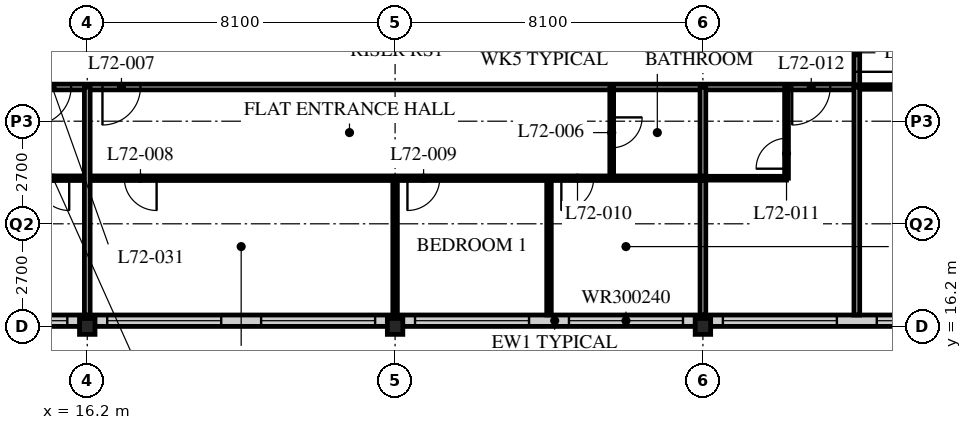
"""IFC4 building model, lengths in metres.
Left out: names, types, materials, properties, quantities, classifications, styles, units other than length and angle.
Written with IfcOpenShell. Run it as: python <this file> out.ifc"""

import sys

from ifc_helpers import new_model, si_unit, direction, frame, frame_2d, origin, origin_2d, place, context, subcontext, project, spatial, rectangle, i_section, extrude, element, fill, save


model = new_model("IFC4")
c1 = context("Model", 3, precision=1e-05, world=origin(), true_north=direction((0.0, 1.0)))
c2 = subcontext(c1, "Body", "Model", "MODEL_VIEW")
j1 = project(units=[si_unit("LENGTHUNIT", "METRE"), si_unit("PLANEANGLEUNIT", "RADIAN")], contexts=[c1])
p1 = place(None, origin())
s1 = spatial("IfcSite", under=j1, at=p1, CompositionType="ELEMENT")
p2 = place(p1, origin())
s2 = spatial("IfcBuilding", under=s1, at=p2, CompositionType="ELEMENT")
p3 = place(p2, frame((0.0, 0.0, 281.4)))
s3 = spatial("IfcBuildingStorey", under=s2, at=p3, CompositionType="ELEMENT", Elevation=281.4)
for number, where, z_axis, x_axis in (
    (1, (16.2, 16.2, 0.0), (0.0, 0.0, 1.0), (1.0, 0.0, 0.0)),
    (2, (24.3, 16.2, 0.0), (0.0, 0.0, 1.0), (1.0, 0.0, 0.0)),
    (3, (32.4, 16.2, 0.0), (0.0, 0.0, 1.0), (1.0, 0.0, 0.0)),
):
    element("IfcColumn", number, at=place(p3, frame(where, z_axis=z_axis, x_axis=x_axis)), inside=s3, PredefinedType="COLUMN", context=c2, shape_type="SweptSolid", body=[
        extrude(i_section(OverallWidth=0.407, OverallDepth=0.419, WebThickness=0.031, FlangeThickness=0.049, FilletRadius=0.015, at=origin_2d()), origin(), (0.0, 0.0, 1.0), 3.9),
    ])
p4 = place(p3, frame((8.4, 16.35, 0.0), z_axis=(0.0, 0.0, 1.0), x_axis=(1.0, 0.0, 0.0)))
e4 = element("IfcWall", 4, at=p4, inside=s3, PredefinedType="SOLIDWALL", context=c2, shape_type="SweptSolid", body=[
    extrude(rectangle(XDim=40.2, YDim=0.3, at=frame_2d((20.1, 0.0))), origin(), (0.0, 0.0, 1.0), 3.69),
])
p5 = place(p4, frame((0.225, 0.0, 0.6)))
e5 = element("IfcOpeningElement", 5, at=p5, cuts=e4, PredefinedType="OPENING", context=c2, shape_type="SweptSolid", body=[
    extrude(rectangle(XDim=3.0, YDim=2.4, at=frame_2d((1.5, 1.2))), frame((0.0, 0.16, 0.0), z_axis=(0.0, -1.0, 0.0), x_axis=(1.0, 0.0, 0.0)), (0.0, 0.0, 1.0), 0.32),
])
p6 = place(p4, frame((4.275, 0.0, 0.6)))
e6 = element("IfcOpeningElement", 6, at=p6, cuts=e4, PredefinedType="OPENING", context=c2, shape_type="SweptSolid", body=[
    extrude(rectangle(XDim=3.0, YDim=2.4, at=frame_2d((1.5, 1.2))), frame((0.0, 0.16, 0.0), z_axis=(0.0, -1.0, 0.0), x_axis=(1.0, 0.0, 0.0)), (0.0, 0.0, 1.0), 0.32),
])
p7 = place(p4, frame((8.325, 0.0, 0.6)))
e7 = element("IfcOpeningElement", 7, at=p7, cuts=e4, PredefinedType="OPENING", context=c2, shape_type="SweptSolid", body=[
    extrude(rectangle(XDim=3.0, YDim=2.4, at=frame_2d((1.5, 1.2))), frame((0.0, 0.16, 0.0), z_axis=(0.0, -1.0, 0.0), x_axis=(1.0, 0.0, 0.0)), (0.0, 0.0, 1.0), 0.32),
])
p8 = place(p4, frame((12.375, 0.0, 0.6)))
e8 = element("IfcOpeningElement", 8, at=p8, cuts=e4, PredefinedType="OPENING", context=c2, shape_type="SweptSolid", body=[
    extrude(rectangle(XDim=3.0, YDim=2.4, at=frame_2d((1.5, 1.2))), frame((0.0, 0.16, 0.0), z_axis=(0.0, -1.0, 0.0), x_axis=(1.0, 0.0, 0.0)), (0.0, 0.0, 1.0), 0.32),
])
p9 = place(p4, frame((16.425, 0.0, 0.6)))
e9 = element("IfcOpeningElement", 9, at=p9, cuts=e4, PredefinedType="OPENING", context=c2, shape_type="SweptSolid", body=[
    extrude(rectangle(XDim=3.0, YDim=2.4, at=frame_2d((1.5, 1.2))), frame((0.0, 0.16, 0.0), z_axis=(0.0, -1.0, 0.0), x_axis=(1.0, 0.0, 0.0)), (0.0, 0.0, 1.0), 0.32),
])
p10 = place(p4, frame((20.475, 0.0, 0.6)))
e10 = element("IfcOpeningElement", 10, at=p10, cuts=e4, PredefinedType="OPENING", context=c2, shape_type="SweptSolid", body=[
    extrude(rectangle(XDim=3.0, YDim=2.4, at=frame_2d((1.5, 1.2))), frame((0.0, 0.16, 0.0), z_axis=(0.0, -1.0, 0.0), x_axis=(1.0, 0.0, 0.0)), (0.0, 0.0, 1.0), 0.32),
])
p11 = place(p4, frame((24.525, 0.0, 0.6)))
e11 = element("IfcOpeningElement", 11, at=p11, cuts=e4, PredefinedType="OPENING", context=c2, shape_type="SweptSolid", body=[
    extrude(rectangle(XDim=3.0, YDim=2.4, at=frame_2d((1.5, 1.2))), frame((0.0, 0.16, 0.0), z_axis=(0.0, -1.0, 0.0), x_axis=(1.0, 0.0, 0.0)), (0.0, 0.0, 1.0), 0.32),
])
p12 = place(p4, frame((28.575, 0.0, 0.6)))
e12 = element("IfcOpeningElement", 12, at=p12, cuts=e4, PredefinedType="OPENING", context=c2, shape_type="SweptSolid", body=[
    extrude(rectangle(XDim=3.0, YDim=2.4, at=frame_2d((1.5, 1.2))), frame((0.0, 0.16, 0.0), z_axis=(0.0, -1.0, 0.0), x_axis=(1.0, 0.0, 0.0)), (0.0, 0.0, 1.0), 0.32),
])
p13 = place(p4, frame((32.625, 0.0, 0.6)))
e13 = element("IfcOpeningElement", 13, at=p13, cuts=e4, PredefinedType="OPENING", context=c2, shape_type="SweptSolid", body=[
    extrude(rectangle(XDim=3.0, YDim=2.4, at=frame_2d((1.5, 1.2))), frame((0.0, 0.16, 0.0), z_axis=(0.0, -1.0, 0.0), x_axis=(1.0, 0.0, 0.0)), (0.0, 0.0, 1.0), 0.32),
])
p14 = place(p4, frame((36.675, 0.0, 0.6)))
e14 = element("IfcOpeningElement", 14, at=p14, cuts=e4, PredefinedType="OPENING", context=c2, shape_type="SweptSolid", body=[
    extrude(rectangle(XDim=3.0, YDim=2.4, at=frame_2d((1.5, 1.2))), frame((0.0, 0.16, 0.0), z_axis=(0.0, -1.0, 0.0), x_axis=(1.0, 0.0, 0.0)), (0.0, 0.0, 1.0), 0.32),
])
p15 = place(p3, frame((12.15, 22.5, 0.0), z_axis=(0.0, 0.0, 1.0), x_axis=(1.0, 0.0, 0.0)))
e15 = element("IfcWall", 15, at=p15, inside=s3, PredefinedType="PARTITIONING", context=c2, shape_type="SweptSolid", body=[
    extrude(rectangle(XDim=24.3, YDim=0.15, at=frame_2d((12.15, 0.0))), origin(), (0.0, 0.0, 1.0), 3.69),
])
p16 = place(p15, frame((4.45, 0.0, 0.0)))
e16 = element("IfcOpeningElement", 16, at=p16, cuts=e15, PredefinedType="OPENING", context=c2, shape_type="SweptSolid", body=[
    extrude(rectangle(XDim=1.0, YDim=2.1, at=frame_2d((0.5, 1.05))), frame((0.0, 0.085, 0.0), z_axis=(0.0, -1.0, 0.0), x_axis=(1.0, 0.0, 0.0)), (0.0, 0.0, 1.0), 0.17),
])
p17 = place(p15, frame((22.6, 0.0, 0.0)))
e17 = element("IfcOpeningElement", 17, at=p17, cuts=e15, PredefinedType="OPENING", context=c2, shape_type="SweptSolid", body=[
    extrude(rectangle(XDim=1.0, YDim=2.1, at=frame_2d((0.5, 1.05))), frame((0.0, 0.085, 0.0), z_axis=(0.0, -1.0, 0.0), x_axis=(1.0, 0.0, 0.0)), (0.0, 0.0, 1.0), 0.17),
])
p18 = place(p15, frame((2.625, 0.0, 0.0)))
e18 = element("IfcOpeningElement", 18, at=p18, cuts=e15, PredefinedType="OPENING", context=c2, shape_type="SweptSolid", body=[
    extrude(rectangle(XDim=1.0, YDim=2.1, at=frame_2d((0.5, 1.05))), frame((0.0, 0.085, 0.0), z_axis=(0.0, -1.0, 0.0), x_axis=(1.0, 0.0, 0.0)), (0.0, 0.0, 1.0), 0.17),
])
p19 = place(p3, frame((36.45, 22.5, 0.0), z_axis=(0.0, 0.0, 1.0), x_axis=(0.0, 1.0, 0.0)))
e19 = element("IfcWall", 19, at=p19, inside=s3, PredefinedType="PARTITIONING", context=c2, shape_type="SweptSolid", body=[
    extrude(rectangle(XDim=1.8, YDim=0.15, at=frame_2d((0.9, 0.0))), origin(), (0.0, 0.0, 1.0), 3.69),
])
p20 = place(p19, frame((0.4, 0.0, 0.0)))
e20 = element("IfcOpeningElement", 20, at=p20, cuts=e19, PredefinedType="OPENING", context=c2, shape_type="SweptSolid", body=[
    extrude(rectangle(XDim=1.0, YDim=2.1, at=frame_2d((0.5, 1.05))), frame((0.0, 0.085, 0.0), z_axis=(0.0, -1.0, 0.0), x_axis=(1.0, 0.0, 0.0)), (0.0, 0.0, 1.0), 0.17),
])
p21 = place(p3, frame((30.0, 22.5, 0.0), z_axis=(0.0, 0.0, 1.0), x_axis=(0.0, -1.0, 0.0)))
e21 = element("IfcWall", 21, at=p21, inside=s3, PredefinedType="PARTITIONING", context=c2, shape_type="SweptSolid", body=[
    extrude(rectangle(XDim=2.4, YDim=0.1, at=frame_2d((1.2, 0.0))), origin(), (0.0, 0.0, 1.0), 3.69),
])
p22 = place(p21, frame((0.8, 0.0, 0.0)))
e22 = element("IfcOpeningElement", 22, at=p22, cuts=e21, PredefinedType="OPENING", context=c2, shape_type="SweptSolid", body=[
    extrude(rectangle(XDim=0.8, YDim=2.1, at=frame_2d((0.4, 1.05))), frame((0.0, 0.06, 0.0), z_axis=(0.0, -1.0, 0.0), x_axis=(1.0, 0.0, 0.0)), (0.0, 0.0, 1.0), 0.12),
])
p23 = place(p3, frame((24.3, 20.1, 0.0), z_axis=(0.0, 0.0, 1.0), x_axis=(0.0, -1.0, 0.0)))
e23 = element("IfcWall", 23, at=p23, inside=s3, PredefinedType="PARTITIONING", context=c2, shape_type="SweptSolid", body=[
    extrude(rectangle(XDim=3.6, YDim=0.12, at=frame_2d((1.8, 0.0))), origin(), (0.0, 0.0, 1.0), 3.078),
])
p24 = place(p3, frame((28.35, 20.1, 0.0), z_axis=(0.0, 0.0, 1.0), x_axis=(0.0, -1.0, 0.0)))
e24 = element("IfcWall", 24, at=p24, inside=s3, PredefinedType="PARTITIONING", context=c2, shape_type="SweptSolid", body=[
    extrude(rectangle(XDim=3.6, YDim=0.12, at=frame_2d((1.8, 0.0))), origin(), (0.0, 0.0, 1.0), 3.69),
])
p25 = place(p3, frame((32.4, 22.5, 0.0), z_axis=(0.0, 0.0, 1.0), x_axis=(0.0, -1.0, 0.0)))
e25 = element("IfcWall", 25, at=p25, inside=s3, PredefinedType="PARTITIONING", context=c2, shape_type="SweptSolid", body=[
    extrude(rectangle(XDim=6.0, YDim=0.15, at=frame_2d((3.0, 0.0))), origin(), (0.0, 0.0, 1.0), 3.078),
])
p26 = place(p3, frame((32.4, 20.1, 0.0), z_axis=(0.0, 0.0, 1.0), x_axis=(1.0, 0.0, 0.0)))
e26 = element("IfcWall", 26, at=p26, inside=s3, PredefinedType="PARTITIONING", context=c2, shape_type="SweptSolid", body=[
    extrude(rectangle(XDim=2.2, YDim=0.1, at=frame_2d((1.1, 0.0))), origin(), (0.0, 0.0, 1.0), 3.69),
])
p27 = place(p3, frame((34.6, 22.5, 0.0), z_axis=(0.0, 0.0, 1.0), x_axis=(0.0, -1.0, 0.0)))
e27 = element("IfcWall", 27, at=p27, inside=s3, PredefinedType="PARTITIONING", context=c2, shape_type="SweptSolid", body=[
    extrude(rectangle(XDim=2.4, YDim=0.1, at=frame_2d((1.2, 0.0))), origin(), (0.0, 0.0, 1.0), 3.69),
])
p28 = place(p27, frame((1.35, 0.0, 0.0)))
e28 = element("IfcOpeningElement", 28, at=p28, cuts=e27, PredefinedType="OPENING", context=c2, shape_type="SweptSolid", body=[
    extrude(rectangle(XDim=0.8, YDim=2.1, at=frame_2d((0.4, 1.05))), frame((0.0, 0.06, 0.0), z_axis=(0.0, -1.0, 0.0), x_axis=(1.0, 0.0, 0.0)), (0.0, 0.0, 1.0), 0.12),
])
p29 = place(p3, frame((12.15, 20.1, 0.0), z_axis=(0.0, 0.0, 1.0), x_axis=(1.0, 0.0, 0.0)))
e29 = element("IfcWall", 29, at=p29, inside=s3, PredefinedType="PARTITIONING", context=c2, shape_type="SweptSolid", body=[
    extrude(rectangle(XDim=20.25, YDim=0.12, at=frame_2d((10.125, 0.0))), origin(), (0.0, 0.0, 1.0), 3.69),
])
p30 = place(p29, frame((5.025, 0.0, 0.0)))
e30 = element("IfcOpeningElement", 30, at=p30, cuts=e29, PredefinedType="OPENING", context=c2, shape_type="SweptSolid", body=[
    extrude(rectangle(XDim=0.85, YDim=2.1, at=frame_2d((0.425, 1.05))), frame((0.0, 0.07, 0.0), z_axis=(0.0, -1.0, 0.0), x_axis=(1.0, 0.0, 0.0)), (0.0, 0.0, 1.0), 0.14),
])
p31 = place(p29, frame((12.475, 0.0, 0.0)))
e31 = element("IfcOpeningElement", 31, at=p31, cuts=e29, PredefinedType="OPENING", context=c2, shape_type="SweptSolid", body=[
    extrude(rectangle(XDim=0.85, YDim=2.1, at=frame_2d((0.425, 1.05))), frame((0.0, 0.07, 0.0), z_axis=(0.0, -1.0, 0.0), x_axis=(1.0, 0.0, 0.0)), (0.0, 0.0, 1.0), 0.14),
])
p32 = place(p29, frame((16.525, 0.0, 0.0)))
e32 = element("IfcOpeningElement", 32, at=p32, cuts=e29, PredefinedType="OPENING", context=c2, shape_type="SweptSolid", body=[
    extrude(rectangle(XDim=0.85, YDim=2.1, at=frame_2d((0.425, 1.05))), frame((0.0, 0.07, 0.0), z_axis=(0.0, -1.0, 0.0), x_axis=(1.0, 0.0, 0.0)), (0.0, 0.0, 1.0), 0.14),
])
p33 = place(p29, frame((2.725, 0.0, 0.0)))
e33 = element("IfcOpeningElement", 33, at=p33, cuts=e29, PredefinedType="OPENING", context=c2, shape_type="SweptSolid", body=[
    extrude(rectangle(XDim=0.85, YDim=2.1, at=frame_2d((0.425, 1.05))), frame((0.0, 0.07, 0.0), z_axis=(0.0, -1.0, 0.0), x_axis=(1.0, 0.0, 0.0)), (0.0, 0.0, 1.0), 0.14),
])
p34 = place(p3, frame((16.2, 22.5, 0.0), z_axis=(0.0, 0.0, 1.0), x_axis=(0.0, -1.0, 0.0)))
e34 = element("IfcWall", 34, at=p34, inside=s3, PredefinedType="PARTITIONING", context=c2, shape_type="SweptSolid", body=[
    extrude(rectangle(XDim=6.0, YDim=0.15, at=frame_2d((3.0, 0.0))), origin(), (0.0, 0.0, 1.0), 3.078),
])
p35 = place(p3, frame((36.45, 22.5, 0.0), z_axis=(0.0, 0.0, 1.0), x_axis=(1.0, 0.0, 0.0)))
e35 = element("IfcWall", 35, at=p35, inside=s3, PredefinedType="PARTITIONING", context=c2, shape_type="SweptSolid", body=[
    extrude(rectangle(XDim=6.45, YDim=0.12, at=frame_2d((3.225, 0.0))), origin(), (0.0, 0.0, 1.0), 3.69),
])
p36 = place(p35, frame((2.8, 0.0, 0.0)))
e36 = element("IfcOpeningElement", 36, at=p36, cuts=e35, PredefinedType="OPENING", context=c2, shape_type="SweptSolid", body=[
    extrude(rectangle(XDim=0.85, YDim=2.1, at=frame_2d((0.425, 1.05))), frame((0.0, 0.07, 0.0), z_axis=(0.0, -1.0, 0.0), x_axis=(1.0, 0.0, 0.0)), (0.0, 0.0, 1.0), 0.14),
])
p37 = place(p3, frame((36.45, 16.5, 0.0), z_axis=(0.0, 0.0, 1.0), x_axis=(0.0, 1.0, 0.0)))
e37 = element("IfcWall", 37, at=p37, inside=s3, PredefinedType="PARTITIONING", context=c2, shape_type="SweptSolid", body=[
    extrude(rectangle(XDim=6.0, YDim=0.15, at=frame_2d((3.0, 0.0))), origin(), (0.0, 0.0, 1.0), 3.69),
])
p38 = place(p6, origin())
e38 = element("IfcWindow", 38, at=p38, inside=s3, PartitioningType="SINGLE_PANEL", PredefinedType="WINDOW", context=c2, shape_type="SweptSolid", body=[
    extrude(rectangle(XDim=3.0, YDim=2.4, at=frame_2d((1.5, 1.2))), frame((0.0, 0.03, 0.0), z_axis=(0.0, -1.0, 0.0), x_axis=(1.0, 0.0, 0.0)), (0.0, 0.0, 1.0), 0.06),
])
fill(e6, e38)
p39 = place(p7, origin())
e39 = element("IfcWindow", 39, at=p39, inside=s3, PartitioningType="SINGLE_PANEL", PredefinedType="WINDOW", context=c2, shape_type="SweptSolid", body=[
    extrude(rectangle(XDim=3.0, YDim=2.4, at=frame_2d((1.5, 1.2))), frame((0.0, 0.03, 0.0), z_axis=(0.0, -1.0, 0.0), x_axis=(1.0, 0.0, 0.0)), (0.0, 0.0, 1.0), 0.06),
])
fill(e7, e39)
p40 = place(p8, origin())
e40 = element("IfcWindow", 40, at=p40, inside=s3, PartitioningType="SINGLE_PANEL", PredefinedType="WINDOW", context=c2, shape_type="SweptSolid", body=[
    extrude(rectangle(XDim=3.0, YDim=2.4, at=frame_2d((1.5, 1.2))), frame((0.0, 0.03, 0.0), z_axis=(0.0, -1.0, 0.0), x_axis=(1.0, 0.0, 0.0)), (0.0, 0.0, 1.0), 0.06),
])
fill(e8, e40)
p41 = place(p9, origin())
e41 = element("IfcWindow", 41, at=p41, inside=s3, PartitioningType="SINGLE_PANEL", PredefinedType="WINDOW", context=c2, shape_type="SweptSolid", body=[
    extrude(rectangle(XDim=3.0, YDim=2.4, at=frame_2d((1.5, 1.2))), frame((0.0, 0.03, 0.0), z_axis=(0.0, -1.0, 0.0), x_axis=(1.0, 0.0, 0.0)), (0.0, 0.0, 1.0), 0.06),
])
fill(e9, e41)
p42 = place(p10, origin())
e42 = element("IfcWindow", 42, at=p42, inside=s3, PartitioningType="SINGLE_PANEL", PredefinedType="WINDOW", context=c2, shape_type="SweptSolid", body=[
    extrude(rectangle(XDim=3.0, YDim=2.4, at=frame_2d((1.5, 1.2))), frame((0.0, 0.03, 0.0), z_axis=(0.0, -1.0, 0.0), x_axis=(1.0, 0.0, 0.0)), (0.0, 0.0, 1.0), 0.06),
])
fill(e10, e42)
p43 = place(p11, origin())
e43 = element("IfcWindow", 43, at=p43, inside=s3, PartitioningType="SINGLE_PANEL", PredefinedType="WINDOW", context=c2, shape_type="SweptSolid", body=[
    extrude(rectangle(XDim=3.0, YDim=2.4, at=frame_2d((1.5, 1.2))), frame((0.0, 0.03, 0.0), z_axis=(0.0, -1.0, 0.0), x_axis=(1.0, 0.0, 0.0)), (0.0, 0.0, 1.0), 0.06),
])
fill(e11, e43)
p44 = place(p12, origin())
e44 = element("IfcWindow", 44, at=p44, inside=s3, PartitioningType="SINGLE_PANEL", PredefinedType="WINDOW", context=c2, shape_type="SweptSolid", body=[
    extrude(rectangle(XDim=3.0, YDim=2.4, at=frame_2d((1.5, 1.2))), frame((0.0, 0.03, 0.0), z_axis=(0.0, -1.0, 0.0), x_axis=(1.0, 0.0, 0.0)), (0.0, 0.0, 1.0), 0.06),
])
fill(e12, e44)
p45 = place(p22, origin())
e45 = element("IfcDoor", 45, at=p45, inside=s3, OperationType="SINGLE_SWING_LEFT", PredefinedType="DOOR", context=c2, shape_type="SweptSolid", body=[
    extrude(rectangle(XDim=0.8, YDim=2.1, at=frame_2d((0.4, 1.05))), frame((0.0, 0.025, 0.0), z_axis=(0.0, -1.0, 0.0), x_axis=(1.0, 0.0, 0.0)), (0.0, 0.0, 1.0), 0.05),
])
fill(e22, e45)
p46 = place(p16, origin())
e46 = element("IfcDoor", 46, at=p46, inside=s3, OperationType="SINGLE_SWING_RIGHT", PredefinedType="DOOR", context=c2, shape_type="SweptSolid", body=[
    extrude(rectangle(XDim=1.0, YDim=2.1, at=frame_2d((0.5, 1.05))), frame((0.0, 0.025, 0.0), z_axis=(0.0, -1.0, 0.0), x_axis=(1.0, 0.0, 0.0)), (0.0, 0.0, 1.0), 0.05),
])
fill(e16, e46)
p47 = place(p30, origin())
e47 = element("IfcDoor", 47, at=p47, inside=s3, OperationType="SINGLE_SWING_LEFT", PredefinedType="DOOR", context=c2, shape_type="SweptSolid", body=[
    extrude(rectangle(XDim=0.85, YDim=2.1, at=frame_2d((0.425, 1.05))), frame((0.0, 0.025, 0.0), z_axis=(0.0, -1.0, 0.0), x_axis=(1.0, 0.0, 0.0)), (0.0, 0.0, 1.0), 0.05),
])
fill(e30, e47)
p48 = place(p31, origin())
e48 = element("IfcDoor", 48, at=p48, inside=s3, OperationType="SINGLE_SWING_RIGHT", PredefinedType="DOOR", context=c2, shape_type="SweptSolid", body=[
    extrude(rectangle(XDim=0.85, YDim=2.1, at=frame_2d((0.425, 1.05))), frame((0.0, 0.025, 0.0), z_axis=(0.0, -1.0, 0.0), x_axis=(1.0, 0.0, 0.0)), (0.0, 0.0, 1.0), 0.05),
])
fill(e31, e48)
p49 = place(p32, origin())
e49 = element("IfcDoor", 49, at=p49, inside=s3, OperationType="SINGLE_SWING_RIGHT", PredefinedType="DOOR", context=c2, shape_type="SweptSolid", body=[
    extrude(rectangle(XDim=0.85, YDim=2.1, at=frame_2d((0.425, 1.05))), frame((0.0, 0.025, 0.0), z_axis=(0.0, -1.0, 0.0), x_axis=(1.0, 0.0, 0.0)), (0.0, 0.0, 1.0), 0.05),
])
fill(e32, e49)
p50 = place(p28, origin())
e50 = element("IfcDoor", 50, at=p50, inside=s3, OperationType="SINGLE_SWING_LEFT", PredefinedType="DOOR", context=c2, shape_type="SweptSolid", body=[
    extrude(rectangle(XDim=0.8, YDim=2.1, at=frame_2d((0.4, 1.05))), frame((0.0, 0.025, 0.0), z_axis=(0.0, -1.0, 0.0), x_axis=(1.0, 0.0, 0.0)), (0.0, 0.0, 1.0), 0.05),
])
fill(e28, e50)
p51 = place(p17, origin())
e51 = element("IfcDoor", 51, at=p51, inside=s3, OperationType="SINGLE_SWING_RIGHT", PredefinedType="DOOR", context=c2, shape_type="SweptSolid", body=[
    extrude(rectangle(XDim=1.0, YDim=2.1, at=frame_2d((0.5, 1.05))), frame((0.0, 0.025, 0.0), z_axis=(0.0, -1.0, 0.0), x_axis=(1.0, 0.0, 0.0)), (0.0, 0.0, 1.0), 0.05),
])
fill(e17, e51)
p52 = place(p18, origin())
e52 = element("IfcDoor", 52, at=p52, inside=s3, OperationType="SINGLE_SWING_RIGHT", PredefinedType="DOOR", context=c2, shape_type="SweptSolid", body=[
    extrude(rectangle(XDim=1.0, YDim=2.1, at=frame_2d((0.5, 1.05))), frame((0.0, 0.025, 0.0), z_axis=(0.0, -1.0, 0.0), x_axis=(1.0, 0.0, 0.0)), (0.0, 0.0, 1.0), 0.05),
])
fill(e18, e52)
p53 = place(p33, origin())
e53 = element("IfcDoor", 53, at=p53, inside=s3, OperationType="SINGLE_SWING_LEFT", PredefinedType="DOOR", context=c2, shape_type="SweptSolid", body=[
    extrude(rectangle(XDim=0.85, YDim=2.1, at=frame_2d((0.425, 1.05))), frame((0.0, 0.025, 0.0), z_axis=(0.0, -1.0, 0.0), x_axis=(1.0, 0.0, 0.0)), (0.0, 0.0, 1.0), 0.05),
])
fill(e33, e53)
p54 = place(p20, origin())
e54 = element("IfcDoor", 54, at=p54, inside=s3, OperationType="SINGLE_SWING_RIGHT", PredefinedType="DOOR", context=c2, shape_type="SweptSolid", body=[
    extrude(rectangle(XDim=1.0, YDim=2.1, at=frame_2d((0.5, 1.05))), frame((0.0, 0.025, 0.0), z_axis=(0.0, -1.0, 0.0), x_axis=(1.0, 0.0, 0.0)), (0.0, 0.0, 1.0), 0.05),
])
fill(e20, e54)
save(model, sys.argv[1])
